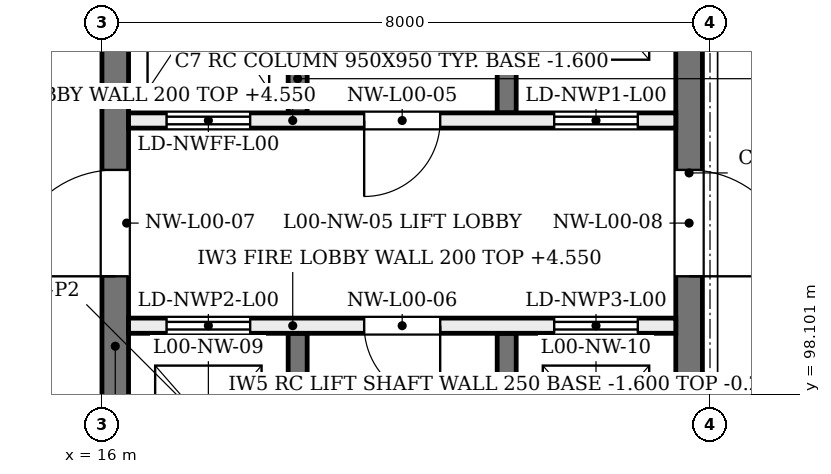
"""IFC4 building model, lengths in metres.
Left out: names, types, materials, properties, quantities, classifications, styles, units other than length and angle.
Written with IfcOpenShell. Run it as: python <this file> out.ifc"""

import sys

from ifc_helpers import new_model, si_unit, direction, frame, frame_2d, origin, place, context, subcontext, project, spatial, rectangle, extrude, element, fill, save


model = new_model("IFC4")
c1 = context("Model", 3, precision=1e-05, world=origin(), true_north=direction((0.0, 1.0)))
c2 = subcontext(c1, "Body", "Model", "MODEL_VIEW")
j1 = project(units=[si_unit("LENGTHUNIT", "METRE"), si_unit("PLANEANGLEUNIT", "RADIAN")], contexts=[c1])
p1 = place(None, origin())
s1 = spatial("IfcSite", under=j1, at=p1, CompositionType="ELEMENT")
p2 = place(p1, origin())
s2 = spatial("IfcBuilding", under=s1, at=p2, CompositionType="ELEMENT")
p3 = place(p2, origin())
s3 = spatial("IfcBuildingStorey", under=s2, at=p3, CompositionType="ELEMENT", Elevation=0.0)
p4 = place(p3, frame((16.175, 96.45, -1.6), z_axis=(0.0, 0.0, 1.0), x_axis=(0.0, 1.0, 0.0)))
e1 = element("IfcWall", 1, at=p4, inside=s3, PredefinedType="SHEAR", context=c2, shape_type="SweptSolid", body=[
    extrude(rectangle(XDim=15.2, YDim=0.35, at=frame_2d((7.6, 0.0))), origin(), (0.0, 0.0, 1.0), 6.18),
])
p5 = place(p4, frame((13.25, 0.0, 1.6)))
e2 = element("IfcOpeningElement", 2, at=p5, cuts=e1, PredefinedType="OPENING", context=c2, shape_type="SweptSolid", body=[
    extrude(rectangle(XDim=1.0, YDim=2.1, at=frame_2d((0.5, 1.05))), frame((0.0, 0.185, 0.0), z_axis=(0.0, -1.0, 0.0), x_axis=(1.0, 0.0, 0.0)), (0.0, 0.0, 1.0), 0.37),
])
p6 = place(p4, frame((3.2, 0.0, 1.6)))
e3 = element("IfcOpeningElement", 3, at=p6, cuts=e1, PredefinedType="OPENING", context=c2, shape_type="SweptSolid", body=[
    extrude(rectangle(XDim=1.4, YDim=2.1, at=frame_2d((0.7, 1.05))), frame((0.0, 0.185, 0.0), z_axis=(0.0, -1.0, 0.0), x_axis=(1.0, 0.0, 0.0)), (0.0, 0.0, 1.0), 0.37),
])
p7 = place(p3, frame((23.725, 96.45, -1.6), z_axis=(0.0, 0.0, 1.0), x_axis=(0.0, 1.0, 0.0)))
e4 = element("IfcWall", 4, at=p7, inside=s3, PredefinedType="SHEAR", context=c2, shape_type="SweptSolid", body=[
    extrude(rectangle(XDim=15.2, YDim=0.35, at=frame_2d((7.6, 0.0))), origin(), (0.0, 0.0, 1.0), 6.18),
])
p8 = place(p7, frame((13.1, 0.0, 1.6)))
e5 = element("IfcOpeningElement", 5, at=p8, cuts=e4, PredefinedType="OPENING", context=c2, shape_type="SweptSolid", body=[
    extrude(rectangle(XDim=1.0, YDim=2.1, at=frame_2d((0.5, 1.05))), frame((0.0, 0.185, 0.0), z_axis=(0.0, -1.0, 0.0), x_axis=(1.0, 0.0, 0.0)), (0.0, 0.0, 1.0), 0.37),
])
p9 = place(p7, frame((3.2, 0.0, 1.6)))
e6 = element("IfcOpeningElement", 6, at=p9, cuts=e4, PredefinedType="OPENING", context=c2, shape_type="SweptSolid", body=[
    extrude(rectangle(XDim=1.4, YDim=2.1, at=frame_2d((0.7, 1.05))), frame((0.0, 0.185, 0.0), z_axis=(0.0, -1.0, 0.0), x_axis=(1.0, 0.0, 0.0)), (0.0, 0.0, 1.0), 0.37),
])
p10 = place(p3, frame((18.575, 104.8, 0.0), z_axis=(0.0, 0.0, 1.0), x_axis=(0.0, -1.0, 0.0)))
e7 = element("IfcWall", 7, at=p10, inside=s3, PredefinedType="SOLIDWALL", context=c2, shape_type="SweptSolid", body=[
    extrude(rectangle(XDim=3.0, YDim=0.25, at=frame_2d((1.5, 0.0))), origin(), (0.0, 0.0, 1.0), 4.55),
])
p11 = place(p3, frame((18.575, 104.8, -1.6), z_axis=(0.0, 0.0, 1.0), x_axis=(0.0, -1.0, 0.0)))
e8 = element("IfcWall", 8, at=p11, inside=s3, PredefinedType="SOLIDWALL", context=c2, shape_type="SweptSolid", body=[
    extrude(rectangle(XDim=3.0, YDim=0.25, at=frame_2d((1.5, 0.0))), origin(), (0.0, 0.0, 1.0), 1.35),
])
p12 = place(p3, frame((18.575, 98.9, 0.0), z_axis=(0.0, 0.0, 1.0), x_axis=(0.0, -1.0, 0.0)))
e9 = element("IfcWall", 9, at=p12, inside=s3, PredefinedType="SOLIDWALL", context=c2, shape_type="SweptSolid", body=[
    extrude(rectangle(XDim=2.45, YDim=0.25, at=frame_2d((1.225, 0.0))), origin(), (0.0, 0.0, 1.0), 4.55),
])
p13 = place(p3, frame((18.575, 98.9, -1.6), z_axis=(0.0, 0.0, 1.0), x_axis=(0.0, -1.0, 0.0)))
e10 = element("IfcWall", 10, at=p13, inside=s3, PredefinedType="SOLIDWALL", context=c2, shape_type="SweptSolid", body=[
    extrude(rectangle(XDim=2.45, YDim=0.25, at=frame_2d((1.225, 0.0))), origin(), (0.0, 0.0, 1.0), 1.35),
])
p14 = place(p3, frame((21.325, 104.8, 0.0), z_axis=(0.0, 0.0, 1.0), x_axis=(0.0, -1.0, 0.0)))
e11 = element("IfcWall", 11, at=p14, inside=s3, PredefinedType="SOLIDWALL", context=c2, shape_type="SweptSolid", body=[
    extrude(rectangle(XDim=3.0, YDim=0.25, at=frame_2d((1.5, 0.0))), origin(), (0.0, 0.0, 1.0), 4.55),
])
p15 = place(p3, frame((21.325, 104.8, -1.6), z_axis=(0.0, 0.0, 1.0), x_axis=(0.0, -1.0, 0.0)))
e12 = element("IfcWall", 12, at=p15, inside=s3, PredefinedType="SOLIDWALL", context=c2, shape_type="SweptSolid", body=[
    extrude(rectangle(XDim=3.0, YDim=0.25, at=frame_2d((1.5, 0.0))), origin(), (0.0, 0.0, 1.0), 1.35),
])
p16 = place(p3, frame((21.325, 98.9, 0.0), z_axis=(0.0, 0.0, 1.0), x_axis=(0.0, -1.0, 0.0)))
e13 = element("IfcWall", 13, at=p16, inside=s3, PredefinedType="SOLIDWALL", context=c2, shape_type="SweptSolid", body=[
    extrude(rectangle(XDim=2.45, YDim=0.25, at=frame_2d((1.225, 0.0))), origin(), (0.0, 0.0, 1.0), 4.55),
])
p17 = place(p3, frame((21.325, 98.9, -1.6), z_axis=(0.0, 0.0, 1.0), x_axis=(0.0, -1.0, 0.0)))
e14 = element("IfcWall", 14, at=p17, inside=s3, PredefinedType="SOLIDWALL", context=c2, shape_type="SweptSolid", body=[
    extrude(rectangle(XDim=2.45, YDim=0.25, at=frame_2d((1.225, 0.0))), origin(), (0.0, 0.0, 1.0), 1.35),
])
p18 = place(p3, frame((16.35, 101.7, 0.0), z_axis=(0.0, 0.0, 1.0), x_axis=(1.0, 0.0, 0.0)))
e15 = element("IfcWall", 15, at=p18, inside=s3, PredefinedType="SOLIDWALL", context=c2, shape_type="SweptSolid", body=[
    extrude(rectangle(XDim=7.2, YDim=0.2, at=frame_2d((3.6, 0.0))), origin(), (0.0, 0.0, 1.0), 4.55),
])
p19 = place(p18, frame((0.5, 0.0, 0.0)))
e16 = element("IfcOpeningElement", 16, at=p19, cuts=e15, PredefinedType="OPENING", context=c2, shape_type="SweptSolid", body=[
    extrude(rectangle(XDim=1.1, YDim=2.1, at=frame_2d((0.55, 1.05))), frame((0.0, 0.11, 0.0), z_axis=(0.0, -1.0, 0.0), x_axis=(1.0, 0.0, 0.0)), (0.0, 0.0, 1.0), 0.22),
])
p20 = place(p18, frame((5.6, 0.0, 0.0)))
e17 = element("IfcOpeningElement", 17, at=p20, cuts=e15, PredefinedType="OPENING", context=c2, shape_type="SweptSolid", body=[
    extrude(rectangle(XDim=1.1, YDim=2.1, at=frame_2d((0.55, 1.05))), frame((0.0, 0.11, 0.0), z_axis=(0.0, -1.0, 0.0), x_axis=(1.0, 0.0, 0.0)), (0.0, 0.0, 1.0), 0.22),
])
p21 = place(p18, frame((3.1, 0.0, 0.0)))
e18 = element("IfcOpeningElement", 18, at=p21, cuts=e15, PredefinedType="OPENING", context=c2, shape_type="SweptSolid", body=[
    extrude(rectangle(XDim=1.0, YDim=2.1, at=frame_2d((0.5, 1.05))), frame((0.0, 0.11, 0.0), z_axis=(0.0, -1.0, 0.0), x_axis=(1.0, 0.0, 0.0)), (0.0, 0.0, 1.0), 0.22),
])
p22 = place(p3, frame((16.35, 99.0, 0.0), z_axis=(0.0, 0.0, 1.0), x_axis=(1.0, 0.0, 0.0)))
e19 = element("IfcWall", 19, at=p22, inside=s3, PredefinedType="SOLIDWALL", context=c2, shape_type="SweptSolid", body=[
    extrude(rectangle(XDim=7.2, YDim=0.2, at=frame_2d((3.6, 0.0))), origin(), (0.0, 0.0, 1.0), 4.55),
])
p23 = place(p22, frame((0.5, 0.0, 0.0)))
e20 = element("IfcOpeningElement", 20, at=p23, cuts=e19, PredefinedType="OPENING", context=c2, shape_type="SweptSolid", body=[
    extrude(rectangle(XDim=1.1, YDim=2.1, at=frame_2d((0.55, 1.05))), frame((0.0, 0.11, 0.0), z_axis=(0.0, -1.0, 0.0), x_axis=(1.0, 0.0, 0.0)), (0.0, 0.0, 1.0), 0.22),
])
p24 = place(p22, frame((5.6, 0.0, 0.0)))
e21 = element("IfcOpeningElement", 21, at=p24, cuts=e19, PredefinedType="OPENING", context=c2, shape_type="SweptSolid", body=[
    extrude(rectangle(XDim=1.1, YDim=2.1, at=frame_2d((0.55, 1.05))), frame((0.0, 0.11, 0.0), z_axis=(0.0, -1.0, 0.0), x_axis=(1.0, 0.0, 0.0)), (0.0, 0.0, 1.0), 0.22),
])
p25 = place(p22, frame((3.1, 0.0, 0.0)))
e22 = element("IfcOpeningElement", 22, at=p25, cuts=e19, PredefinedType="OPENING", context=c2, shape_type="SweptSolid", body=[
    extrude(rectangle(XDim=1.0, YDim=2.1, at=frame_2d((0.5, 1.05))), frame((0.0, 0.11, 0.0), z_axis=(0.0, -1.0, 0.0), x_axis=(1.0, 0.0, 0.0)), (0.0, 0.0, 1.0), 0.22),
])
p26 = place(p19, frame((1.1, 0.0, 0.0), z_axis=(0.0, 0.0, 1.0), x_axis=(-1.0, 0.0, 0.0)))
e23 = element("IfcDoor", 23, at=p26, inside=s3, OperationType="DOUBLE_DOOR_SLIDING", PredefinedType="DOOR", context=c2, shape_type="SweptSolid", body=[
    extrude(rectangle(XDim=1.1, YDim=2.1, at=frame_2d((0.55, 1.05))), frame((0.0, 0.025, 0.0), z_axis=(0.0, -1.0, 0.0), x_axis=(1.0, 0.0, 0.0)), (0.0, 0.0, 1.0), 0.05),
])
fill(e16, e23)
p27 = place(p20, frame((1.1, 0.0, 0.0), z_axis=(0.0, 0.0, 1.0), x_axis=(-1.0, 0.0, 0.0)))
e24 = element("IfcDoor", 24, at=p27, inside=s3, OperationType="DOUBLE_DOOR_SLIDING", PredefinedType="DOOR", context=c2, shape_type="SweptSolid", body=[
    extrude(rectangle(XDim=1.1, YDim=2.1, at=frame_2d((0.55, 1.05))), frame((0.0, 0.025, 0.0), z_axis=(0.0, -1.0, 0.0), x_axis=(1.0, 0.0, 0.0)), (0.0, 0.0, 1.0), 0.05),
])
fill(e17, e24)
p28 = place(p23, origin())
e25 = element("IfcDoor", 25, at=p28, inside=s3, OperationType="DOUBLE_DOOR_SLIDING", PredefinedType="DOOR", context=c2, shape_type="SweptSolid", body=[
    extrude(rectangle(XDim=1.1, YDim=2.1, at=frame_2d((0.55, 1.05))), frame((0.0, 0.025, 0.0), z_axis=(0.0, -1.0, 0.0), x_axis=(1.0, 0.0, 0.0)), (0.0, 0.0, 1.0), 0.05),
])
fill(e20, e25)
p29 = place(p24, origin())
e26 = element("IfcDoor", 26, at=p29, inside=s3, OperationType="DOUBLE_DOOR_SLIDING", PredefinedType="DOOR", context=c2, shape_type="SweptSolid", body=[
    extrude(rectangle(XDim=1.1, YDim=2.1, at=frame_2d((0.55, 1.05))), frame((0.0, 0.025, 0.0), z_axis=(0.0, -1.0, 0.0), x_axis=(1.0, 0.0, 0.0)), (0.0, 0.0, 1.0), 0.05),
])
fill(e21, e26)
p30 = place(p21, frame((1.0, 0.0, 0.0), z_axis=(0.0, 0.0, 1.0), x_axis=(-1.0, 0.0, 0.0)))
e27 = element("IfcDoor", 27, at=p30, inside=s3, OperationType="SINGLE_SWING_LEFT", PredefinedType="DOOR", context=c2, shape_type="SweptSolid", body=[
    extrude(rectangle(XDim=1.0, YDim=2.1, at=frame_2d((0.5, 1.05))), frame((0.0, 0.025, 0.0), z_axis=(0.0, -1.0, 0.0), x_axis=(1.0, 0.0, 0.0)), (0.0, 0.0, 1.0), 0.05),
])
fill(e18, e27)
p31 = place(p25, origin())
e28 = element("IfcDoor", 28, at=p31, inside=s3, OperationType="SINGLE_SWING_RIGHT", PredefinedType="DOOR", context=c2, shape_type="SweptSolid", body=[
    extrude(rectangle(XDim=1.0, YDim=2.1, at=frame_2d((0.5, 1.05))), frame((0.0, 0.025, 0.0), z_axis=(0.0, -1.0, 0.0), x_axis=(1.0, 0.0, 0.0)), (0.0, 0.0, 1.0), 0.05),
])
fill(e22, e28)
p32 = place(p6, origin())
e29 = element("IfcDoor", 29, at=p32, inside=s3, OperationType="SINGLE_SWING_LEFT", PredefinedType="DOOR", context=c2, shape_type="SweptSolid", body=[
    extrude(rectangle(XDim=1.4, YDim=2.1, at=frame_2d((0.7, 1.05))), frame((0.0, 0.025, 0.0), z_axis=(0.0, -1.0, 0.0), x_axis=(1.0, 0.0, 0.0)), (0.0, 0.0, 1.0), 0.05),
])
fill(e3, e29)
p33 = place(p9, frame((1.4, 0.0, 0.0), z_axis=(0.0, 0.0, 1.0), x_axis=(-1.0, 0.0, 0.0)))
e30 = element("IfcDoor", 30, at=p33, inside=s3, OperationType="SINGLE_SWING_LEFT", PredefinedType="DOOR", context=c2, shape_type="SweptSolid", body=[
    extrude(rectangle(XDim=1.4, YDim=2.1, at=frame_2d((0.7, 1.05))), frame((0.0, 0.025, 0.0), z_axis=(0.0, -1.0, 0.0), x_axis=(1.0, 0.0, 0.0)), (0.0, 0.0, 1.0), 0.05),
])
fill(e6, e30)
save(model, sys.argv[1])
